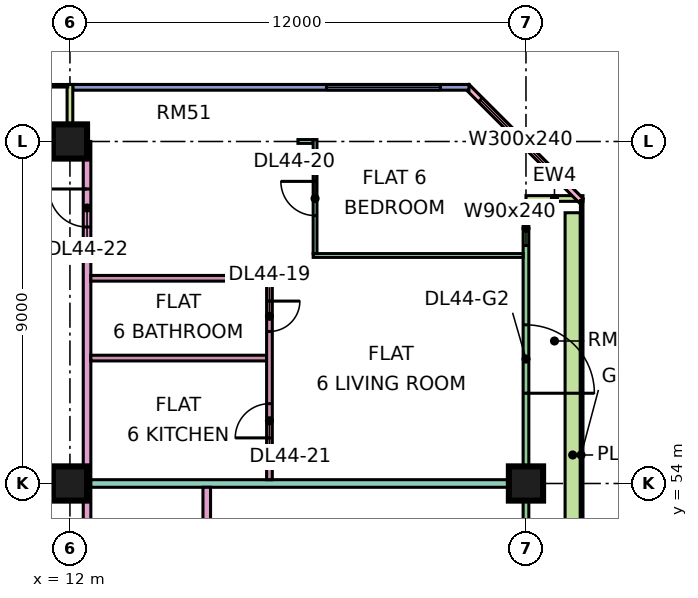
"""IFC4 building model, lengths in metres.
Left out: names, types, materials, properties, quantities, classifications, styles, units other than length and angle.
Written with IfcOpenShell. Run it as: python <this file> out.ifc"""

import sys

from ifc_helpers import new_model, si_unit, direction, frame, frame_2d, origin, origin_2d, place, context, subcontext, project, spatial, rectangle, extrude, element, fill, save


model = new_model("IFC4")
c1 = context("Model", 3, precision=1e-05, world=origin(), true_north=direction((0.0, 1.0)))
c2 = subcontext(c1, "Body", "Model", "MODEL_VIEW")
j1 = project(units=[si_unit("LENGTHUNIT", "METRE"), si_unit("PLANEANGLEUNIT", "RADIAN")], contexts=[c1])
p1 = place(None, origin())
s1 = spatial("IfcSite", under=j1, at=p1, CompositionType="ELEMENT")
p2 = place(p1, origin())
s2 = spatial("IfcBuilding", under=s1, at=p2, CompositionType="ELEMENT")
p3 = place(p2, frame((0.0, 0.0, 191.15)))
s3 = spatial("IfcBuildingStorey", under=s2, at=p3, CompositionType="ELEMENT", Elevation=191.15)
for number, where, z_axis, x_axis in (
    (1, (12.0, 54.0, 0.0), (0.0, 0.0, 1.0), (1.0, 0.0, 0.0)),
    (2, (12.0, 63.0, 0.0), (0.0, 0.0, 1.0), (1.0, 0.0, 0.0)),
    (3, (24.0, 54.0, 0.0), (0.0, 0.0, 1.0), (1.0, 0.0, 0.0)),
):
    element("IfcColumn", number, at=place(p3, frame(where, z_axis=z_axis, x_axis=x_axis)), inside=s3, PredefinedType="COLUMN", context=c2, shape_type="SweptSolid", body=[
        extrude(rectangle(XDim=0.9, YDim=0.9, at=origin_2d()), origin(), (0.0, 0.0, 1.0), 3.75),
    ])
p4 = place(p3, frame((24.0, 48.075, 0.0), z_axis=(0.0, 0.0, 1.0), x_axis=(0.0, 1.0, 0.0)))
e4 = element("IfcWall", 4, at=p4, inside=s3, PredefinedType="SOLIDWALL", context=c2, shape_type="SweptSolid", body=[
    extrude(rectangle(XDim=13.35, YDim=0.15, at=frame_2d((6.675, 0.0))), origin(), (0.0, 0.0, 1.0), 3.35),
])
p5 = place(p4, frame((0.587, 0.0, 0.45)))
e5 = element("IfcOpeningElement", 5, at=p5, cuts=e4, PredefinedType="OPENING", context=c2, shape_type="SweptSolid", body=[
    extrude(rectangle(XDim=4.2, YDim=2.4, at=frame_2d((2.1, 1.2))), frame((0.0, 0.085, 0.0), z_axis=(0.0, -1.0, 0.0), x_axis=(1.0, 0.0, 0.0)), (0.0, 0.0, 1.0), 0.17),
])
p6 = place(p4, frame((8.3, 0.0, 0.0)))
e6 = element("IfcOpeningElement", 6, at=p6, cuts=e4, PredefinedType="OPENING", context=c2, shape_type="SweptSolid", body=[
    extrude(rectangle(XDim=1.8, YDim=2.4, at=frame_2d((0.9, 1.2))), frame((0.0, 0.085, 0.0), z_axis=(0.0, -1.0, 0.0), x_axis=(1.0, 0.0, 0.0)), (0.0, 0.0, 1.0), 0.17),
])
p7 = place(p4, frame((12.188, 0.0, 0.45)))
e7 = element("IfcOpeningElement", 7, at=p7, cuts=e4, PredefinedType="OPENING", context=c2, shape_type="SweptSolid", body=[
    extrude(rectangle(XDim=0.9, YDim=2.4, at=frame_2d((0.45, 1.2))), frame((0.0, 0.085, 0.0), z_axis=(0.0, -1.0, 0.0), x_axis=(1.0, 0.0, 0.0)), (0.0, 0.0, 1.0), 0.17),
])
p8 = place(p3, frame((25.5, 61.5, 0.0), z_axis=(0.0, 0.0, 1.0), x_axis=(-1.0, 0.0, 0.0)))
e8 = element("IfcWall", 8, at=p8, inside=s3, PredefinedType="SOLIDWALL", context=c2, shape_type="SweptSolid", body=[
    extrude(rectangle(XDim=1.5, YDim=0.15, at=frame_2d((0.75, 0.0))), origin(), (0.0, 0.0, 1.0), 3.35),
])
p9 = place(p3, frame((25.447, 61.447, 0.0), z_axis=(0.0, 0.0, 1.0), x_axis=(-0.707106781187, 0.707106781187, 0.0)))
e9 = element("IfcWall", 9, at=p9, inside=s3, PredefinedType="SOLIDWALL", context=c2, shape_type="SweptSolid", body=[
    extrude(rectangle(XDim=4.243, YDim=0.15, at=frame_2d((2.121, 0.0))), origin(), (0.0, 0.0, 1.0), 3.35),
])
p10 = place(p9, frame((0.744, 0.0, 0.45)))
e10 = element("IfcOpeningElement", 10, at=p10, cuts=e9, PredefinedType="OPENING", context=c2, shape_type="SweptSolid", body=[
    extrude(rectangle(XDim=3.0, YDim=2.4, at=frame_2d((1.5, 1.2))), frame((0.0, 0.085, 0.0), z_axis=(0.0, -1.0, 0.0), x_axis=(1.0, 0.0, 0.0)), (0.0, 0.0, 1.0), 0.17),
])
p11 = place(p3, frame((22.5, 64.425, 0.0), z_axis=(0.0, 0.0, 1.0), x_axis=(-1.0, 0.0, 0.0)))
e11 = element("IfcWall", 11, at=p11, inside=s3, PredefinedType="SOLIDWALL", context=c2, shape_type="SweptSolid", body=[
    extrude(rectangle(XDim=10.425, YDim=0.15, at=frame_2d((5.212, 0.0))), origin(), (0.0, 0.0, 1.0), 3.35),
])
p12 = place(p11, frame((0.75, 0.0, 0.45)))
e12 = element("IfcOpeningElement", 12, at=p12, cuts=e11, PredefinedType="OPENING", context=c2, shape_type="SweptSolid", body=[
    extrude(rectangle(XDim=3.0, YDim=2.4, at=frame_2d((1.5, 1.2))), frame((0.0, 0.085, 0.0), z_axis=(0.0, -1.0, 0.0), x_axis=(1.0, 0.0, 0.0)), (0.0, 0.0, 1.0), 0.17),
])
p13 = place(p3, frame((11.925, 63.0, 0.0), z_axis=(0.0, 0.0, 1.0), x_axis=(-1.0, 0.0, 0.0)))
e13 = element("IfcWall", 13, at=p13, inside=s3, PredefinedType="SOLIDWALL", context=c2, shape_type="SweptSolid", body=[
    extrude(rectangle(XDim=10.35, YDim=0.15, at=frame_2d((5.175, 0.0))), origin(), (0.0, 0.0, 1.0), 3.35),
])
p14 = place(p13, frame((2.775, 0.0, 0.45)))
e14 = element("IfcOpeningElement", 14, at=p14, cuts=e13, PredefinedType="OPENING", context=c2, shape_type="SweptSolid", body=[
    extrude(rectangle(XDim=1.8, YDim=2.4, at=frame_2d((0.9, 1.2))), frame((0.0, 0.085, 0.0), z_axis=(0.0, -1.0, 0.0), x_axis=(1.0, 0.0, 0.0)), (0.0, 0.0, 1.0), 0.17),
])
p15 = place(p13, frame((7.387, 0.0, 0.0)))
e15 = element("IfcOpeningElement", 15, at=p15, cuts=e13, PredefinedType="OPENING", context=c2, shape_type="SweptSolid", body=[
    extrude(rectangle(XDim=1.8, YDim=2.4, at=frame_2d((0.9, 1.2))), frame((0.0, 0.085, 0.0), z_axis=(0.0, -1.0, 0.0), x_axis=(1.0, 0.0, 0.0)), (0.0, 0.0, 1.0), 0.17),
])
p16 = place(p3, frame((12.0, 64.5, 0.0), z_axis=(0.0, 0.0, 1.0), x_axis=(0.0, -1.0, 0.0)))
e16 = element("IfcWall", 16, at=p16, inside=s3, PredefinedType="SOLIDWALL", context=c2, shape_type="SweptSolid", body=[
    extrude(rectangle(XDim=1.5, YDim=0.15, at=frame_2d((0.75, 0.0))), origin(), (0.0, 0.0, 1.0), 3.35),
])
p17 = place(p3, frame((25.229, 48.375, 0.0), z_axis=(0.0, 0.0, 1.0), x_axis=(0.0, 1.0, 0.0)))
e17 = element("IfcWall", 17, at=p17, inside=s3, PredefinedType="SOLIDWALL", context=c2, shape_type="SweptSolid", body=[
    extrude(rectangle(XDim=12.75, YDim=0.4, at=frame_2d((6.375, 0.0))), origin(), (0.0, 0.0, 1.0), 0.7),
])
p18 = place(p3, frame((12.45, 20.0, 0.0), z_axis=(0.0, 0.0, 1.0), x_axis=(0.0, 1.0, 0.0)))
e18 = element("IfcWall", 18, at=p18, inside=s3, PredefinedType="PARTITIONING", context=c2, shape_type="SweptSolid", body=[
    extrude(rectangle(XDim=43.0, YDim=0.2, at=frame_2d((21.5, 0.0))), origin(), (0.0, 0.0, 1.0), 3.35),
])
p19 = place(p18, frame((6.7, 0.0, 0.0)))
e19 = element("IfcOpeningElement", 19, at=p19, cuts=e18, PredefinedType="OPENING", context=c2, shape_type="SweptSolid", body=[
    extrude(rectangle(XDim=1.6, YDim=2.1, at=frame_2d((0.8, 1.05))), frame((0.0, 0.11, 0.0), z_axis=(0.0, -1.0, 0.0), x_axis=(1.0, 0.0, 0.0)), (0.0, 0.0, 1.0), 0.22),
])
p20 = place(p18, frame((12.95, 0.0, 0.0)))
e20 = element("IfcOpeningElement", 20, at=p20, cuts=e18, PredefinedType="OPENING", context=c2, shape_type="SweptSolid", body=[
    extrude(rectangle(XDim=1.0, YDim=2.1, at=frame_2d((0.5, 1.05))), frame((0.0, 0.11, 0.0), z_axis=(0.0, -1.0, 0.0), x_axis=(1.0, 0.0, 0.0)), (0.0, 0.0, 1.0), 0.22),
])
p21 = place(p18, frame((16.9, 0.0, 0.0)))
e21 = element("IfcOpeningElement", 21, at=p21, cuts=e18, PredefinedType="OPENING", context=c2, shape_type="SweptSolid", body=[
    extrude(rectangle(XDim=1.0, YDim=2.1, at=frame_2d((0.5, 1.05))), frame((0.0, 0.11, 0.0), z_axis=(0.0, -1.0, 0.0), x_axis=(1.0, 0.0, 0.0)), (0.0, 0.0, 1.0), 0.22),
])
p22 = place(p18, frame((40.75, 0.0, 0.0)))
e22 = element("IfcOpeningElement", 22, at=p22, cuts=e18, PredefinedType="OPENING", context=c2, shape_type="SweptSolid", body=[
    extrude(rectangle(XDim=1.0, YDim=2.1, at=frame_2d((0.5, 1.05))), frame((0.0, 0.11, 0.0), z_axis=(0.0, -1.0, 0.0), x_axis=(1.0, 0.0, 0.0)), (0.0, 0.0, 1.0), 0.22),
])
p23 = place(p18, frame((1.15, 0.0, 0.0)))
e23 = element("IfcOpeningElement", 23, at=p23, cuts=e18, PredefinedType="OPENING", context=c2, shape_type="SweptSolid", body=[
    extrude(rectangle(XDim=1.8, YDim=2.1, at=frame_2d((0.9, 1.05))), frame((0.0, 0.11, 0.0), z_axis=(0.0, -1.0, 0.0), x_axis=(1.0, 0.0, 0.0)), (0.0, 0.0, 1.0), 0.22),
])
p24 = place(p18, frame((28.6, 0.0, 0.0)))
e24 = element("IfcOpeningElement", 24, at=p24, cuts=e18, PredefinedType="OPENING", context=c2, shape_type="SweptSolid", body=[
    extrude(rectangle(XDim=1.8, YDim=2.1, at=frame_2d((0.9, 1.05))), frame((0.0, 0.11, 0.0), z_axis=(0.0, -1.0, 0.0), x_axis=(1.0, 0.0, 0.0)), (0.0, 0.0, 1.0), 0.22),
])
p25 = place(p3, frame((12.55, 54.0, 0.0), z_axis=(0.0, 0.0, 1.0), x_axis=(1.0, 0.0, 0.0)))
e25 = element("IfcWall", 25, at=p25, inside=s3, PredefinedType="PARTITIONING", context=c2, shape_type="SweptSolid", body=[
    extrude(rectangle(XDim=11.376, YDim=0.2, at=frame_2d((5.688, 0.0))), origin(), (0.0, 0.0, 1.0), 3.35),
])
for number, where, z_axis, x_axis in (
    (26, (12.55, 57.3, 0.0), (0.0, 0.0, 1.0), (1.0, 0.0, 0.0)),
    (27, (12.55, 59.4, 0.0), (0.0, 0.0, 1.0), (1.0, 0.0, 0.0)),
):
    element("IfcWall", number, at=place(p3, frame(where, z_axis=z_axis, x_axis=x_axis)), inside=s3, PredefinedType="PARTITIONING", context=c2, shape_type="SweptSolid", body=[
        extrude(rectangle(XDim=4.625, YDim=0.15, at=frame_2d((2.312, 0.0))), origin(), (0.0, 0.0, 1.0), 3.35),
    ])
p26 = place(p3, frame((15.6, 51.225, 0.0), z_axis=(0.0, 0.0, 1.0), x_axis=(0.0, 1.0, 0.0)))
e28 = element("IfcWall", 28, at=p26, inside=s3, PredefinedType="PARTITIONING", context=c2, shape_type="SweptSolid", body=[
    extrude(rectangle(XDim=2.675, YDim=0.2, at=frame_2d((1.337, 0.0))), origin(), (0.0, 0.0, 1.0), 3.35),
])
p27 = place(p3, frame((17.25, 54.1, 0.0), z_axis=(0.0, 0.0, 1.0), x_axis=(0.0, 1.0, 0.0)))
e29 = element("IfcWall", 29, at=p27, inside=s3, PredefinedType="PARTITIONING", context=c2, shape_type="SweptSolid", body=[
    extrude(rectangle(XDim=5.375, YDim=0.15, at=frame_2d((2.688, 0.0))), origin(), (0.0, 0.0, 1.0), 3.35),
])
p28 = place(p27, frame((3.9, 0.0, 0.0)))
e30 = element("IfcOpeningElement", 30, at=p28, cuts=e29, PredefinedType="OPENING", context=c2, shape_type="SweptSolid", body=[
    extrude(rectangle(XDim=0.8, YDim=2.1, at=frame_2d((0.4, 1.05))), frame((0.0, 0.085, 0.0), z_axis=(0.0, -1.0, 0.0), x_axis=(1.0, 0.0, 0.0)), (0.0, 0.0, 1.0), 0.17),
])
p29 = place(p27, frame((1.1, 0.0, 0.0)))
e31 = element("IfcOpeningElement", 31, at=p29, cuts=e29, PredefinedType="OPENING", context=c2, shape_type="SweptSolid", body=[
    extrude(rectangle(XDim=0.9, YDim=2.1, at=frame_2d((0.45, 1.05))), frame((0.0, 0.085, 0.0), z_axis=(0.0, -1.0, 0.0), x_axis=(1.0, 0.0, 0.0)), (0.0, 0.0, 1.0), 0.17),
])
p30 = place(p3, frame((18.0, 63.0, 0.0), z_axis=(0.0, 0.0, 1.0), x_axis=(1.0, 0.0, 0.0)))
e32 = element("IfcWall", 32, at=p30, inside=s3, PredefinedType="PARTITIONING", context=c2, shape_type="SweptSolid", body=[
    extrude(rectangle(XDim=0.4, YDim=0.1, at=frame_2d((0.2, 0.0))), origin(), (0.0, 0.0, 1.0), 3.35),
])
p31 = place(p3, frame((18.4, 60.0, 0.0), z_axis=(0.0, 0.0, 1.0), x_axis=(1.0, 0.0, 0.0)))
e33 = element("IfcWall", 33, at=p31, inside=s3, PredefinedType="PARTITIONING", context=c2, shape_type="SweptSolid", body=[
    extrude(rectangle(XDim=5.526, YDim=0.1, at=frame_2d((2.763, 0.0))), origin(), (0.0, 0.0, 1.0), 3.35),
])
p32 = place(p3, frame((18.45, 60.05, 0.0), z_axis=(0.0, 0.0, 1.0), x_axis=(0.0, 1.0, 0.0)))
e34 = element("IfcWall", 34, at=p32, inside=s3, PredefinedType="PARTITIONING", context=c2, shape_type="SweptSolid", body=[
    extrude(rectangle(XDim=3.0, YDim=0.1, at=frame_2d((1.5, 0.0))), origin(), (0.0, 0.0, 1.0), 3.35),
])
p33 = place(p32, frame((1.0, 0.0, 0.0)))
e35 = element("IfcOpeningElement", 35, at=p33, cuts=e34, PredefinedType="OPENING", context=c2, shape_type="SweptSolid", body=[
    extrude(rectangle(XDim=0.9, YDim=2.1, at=frame_2d((0.45, 1.05))), frame((0.0, 0.06, 0.0), z_axis=(0.0, -1.0, 0.0), x_axis=(1.0, 0.0, 0.0)), (0.0, 0.0, 1.0), 0.12),
])
p34 = place(p6, frame((1.8, 0.0, 0.0), z_axis=(0.0, 0.0, 1.0), x_axis=(-1.0, 0.0, 0.0)))
e36 = element("IfcDoor", 36, at=p34, inside=s3, OperationType="DOUBLE_DOOR_SINGLE_SWING", PredefinedType="DOOR", context=c2, shape_type="SweptSolid", body=[
    extrude(rectangle(XDim=1.8, YDim=2.4, at=frame_2d((0.9, 1.2))), frame((0.0, 0.025, 0.0), z_axis=(0.0, -1.0, 0.0), x_axis=(1.0, 0.0, 0.0)), (0.0, 0.0, 1.0), 0.05),
])
fill(e6, e36)
p35 = place(p7, origin())
e37 = element("IfcWindow", 37, at=p35, inside=s3, PartitioningType="SINGLE_PANEL", PredefinedType="WINDOW", context=c2, shape_type="SweptSolid", body=[
    extrude(rectangle(XDim=0.9, YDim=2.4, at=frame_2d((0.45, 1.2))), frame((0.0, 0.03, 0.0), z_axis=(0.0, -1.0, 0.0), x_axis=(1.0, 0.0, 0.0)), (0.0, 0.0, 1.0), 0.06),
])
fill(e7, e37)
p36 = place(p10, origin())
e38 = element("IfcWindow", 38, at=p36, inside=s3, PartitioningType="SINGLE_PANEL", PredefinedType="WINDOW", context=c2, shape_type="SweptSolid", body=[
    extrude(rectangle(XDim=3.0, YDim=2.4, at=frame_2d((1.5, 1.2))), frame((0.0, 0.03, 0.0), z_axis=(0.0, -1.0, 0.0), x_axis=(1.0, 0.0, 0.0)), (0.0, 0.0, 1.0), 0.06),
])
fill(e10, e38)
p37 = place(p12, origin())
e39 = element("IfcWindow", 39, at=p37, inside=s3, PartitioningType="SINGLE_PANEL", PredefinedType="WINDOW", context=c2, shape_type="SweptSolid", body=[
    extrude(rectangle(XDim=3.0, YDim=2.4, at=frame_2d((1.5, 1.2))), frame((0.0, 0.03, 0.0), z_axis=(0.0, -1.0, 0.0), x_axis=(1.0, 0.0, 0.0)), (0.0, 0.0, 1.0), 0.06),
])
fill(e12, e39)
p38 = place(p28, origin())
e40 = element("IfcDoor", 40, at=p38, inside=s3, OperationType="SINGLE_SWING_RIGHT", PredefinedType="DOOR", context=c2, shape_type="SweptSolid", body=[
    extrude(rectangle(XDim=0.8, YDim=2.1, at=frame_2d((0.4, 1.05))), frame((0.0, 0.025, 0.0), z_axis=(0.0, -1.0, 0.0), x_axis=(1.0, 0.0, 0.0)), (0.0, 0.0, 1.0), 0.05),
])
fill(e30, e40)
p39 = place(p33, frame((0.9, 0.0, 0.0), z_axis=(0.0, 0.0, 1.0), x_axis=(-1.0, 0.0, 0.0)))
e41 = element("IfcDoor", 41, at=p39, inside=s3, OperationType="SINGLE_SWING_RIGHT", PredefinedType="DOOR", context=c2, shape_type="SweptSolid", body=[
    extrude(rectangle(XDim=0.9, YDim=2.1, at=frame_2d((0.45, 1.05))), frame((0.0, 0.025, 0.0), z_axis=(0.0, -1.0, 0.0), x_axis=(1.0, 0.0, 0.0)), (0.0, 0.0, 1.0), 0.05),
])
fill(e35, e41)
p40 = place(p29, origin())
e42 = element("IfcDoor", 42, at=p40, inside=s3, OperationType="SINGLE_SWING_LEFT", PredefinedType="DOOR", context=c2, shape_type="SweptSolid", body=[
    extrude(rectangle(XDim=0.9, YDim=2.1, at=frame_2d((0.45, 1.05))), frame((0.0, 0.025, 0.0), z_axis=(0.0, -1.0, 0.0), x_axis=(1.0, 0.0, 0.0)), (0.0, 0.0, 1.0), 0.05),
])
fill(e31, e42)
p41 = place(p22, frame((1.0, 0.0, 0.0), z_axis=(0.0, 0.0, 1.0), x_axis=(-1.0, 0.0, 0.0)))
e43 = element("IfcDoor", 43, at=p41, inside=s3, OperationType="SINGLE_SWING_RIGHT", PredefinedType="DOOR", context=c2, shape_type="SweptSolid", body=[
    extrude(rectangle(XDim=1.0, YDim=2.1, at=frame_2d((0.5, 1.05))), frame((0.0, 0.025, 0.0), z_axis=(0.0, -1.0, 0.0), x_axis=(1.0, 0.0, 0.0)), (0.0, 0.0, 1.0), 0.05),
])
fill(e22, e43)
save(model, sys.argv[1])
